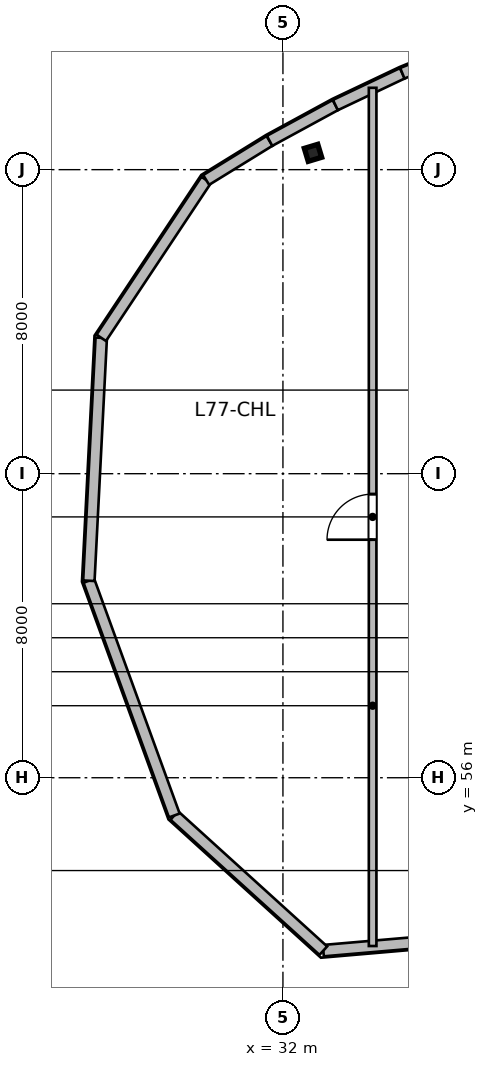
"""IFC4 building model, lengths in metres.
Left out: names, types, materials, properties, quantities, classifications, styles, units other than length and angle.
Written with IfcOpenShell. Run it as: python <this file> out.ifc"""

import sys

from ifc_helpers import new_model, si_unit, direction, frame, frame_2d, origin, origin_2d, place, context, subcontext, project, spatial, rectangle, i_section, extrude, source, transform, mapped, element, fill, save


model = new_model("IFC4")
c1 = context("Model", 3, precision=1e-05, world=origin(), true_north=direction((0.0, 1.0)))
c2 = subcontext(c1, "Body", "Model", "MODEL_VIEW")
j1 = project(units=[si_unit("LENGTHUNIT", "METRE"), si_unit("PLANEANGLEUNIT", "RADIAN")], contexts=[c1])
p1 = place(None, origin())
s1 = spatial("IfcSite", under=j1, at=p1, CompositionType="ELEMENT")
p2 = place(p1, origin())
s2 = spatial("IfcBuilding", under=s1, at=p2, CompositionType="ELEMENT")
p3 = place(p2, frame((0.0, 0.0, 318.0)))
s3 = spatial("IfcBuildingStorey", under=s2, at=p3, CompositionType="ELEMENT", Elevation=318.0)
m1 = source(origin(), c2, "Body", "SweptSolid", [
    extrude(i_section(OverallWidth=0.369, OverallDepth=0.356, WebThickness=0.011, FlangeThickness=0.018, at=origin_2d()), origin(), (0.0, 0.0, 1.0), 5.4),
])
p4 = place(p3, frame((32.791, 72.442, 0.0), z_axis=(0.0, 0.0, 1.0), x_axis=(-0.288697611798, 0.957420330337, 0.0)))
e1 = element("IfcColumn", 1, at=p4, inside=s3, PredefinedType="COLUMN", context=c2, shape_type="MappedRepresentation", body=[
    mapped(m1, transform((0.0, 0.0, 0.0), scale=1.0)),
])
m2 = source(origin(), c2, "Body", "SweptSolid", [
    extrude(rectangle(XDim=4.111, YDim=0.3, at=frame_2d((2.055, 0.0))), origin(), (0.0, 0.0, 1.0), 5.12),
])
p5 = place(p3, frame((37.158, 51.803, 0.0), z_axis=(0.0, 0.0, 1.0), x_axis=(-0.996300298771, -0.085940180764, 0.0)))
e2 = element("IfcWall", 2, at=p5, inside=s3, PredefinedType="SOLIDWALL", context=c2, shape_type="MappedRepresentation", body=[
    mapped(m2, transform((0.0, 0.0, 0.0), scale=1.0)),
])
m3 = source(origin(), c2, "Body", "SweptSolid", [
    extrude(rectangle(XDim=5.294, YDim=0.3, at=frame_2d((2.647, 0.0))), origin(), (0.0, 0.0, 1.0), 5.12),
])
p6 = place(p3, frame((33.062, 51.45, 0.0), z_axis=(0.0, 0.0, 1.0), x_axis=(-0.740695017527, 0.671841418052, 0.0)))
e3 = element("IfcWall", 3, at=p6, inside=s3, PredefinedType="SOLIDWALL", context=c2, shape_type="MappedRepresentation", body=[
    mapped(m3, transform((0.0, 0.0, 0.0), scale=1.0)),
])
m4 = source(origin(), c2, "Body", "SweptSolid", [
    extrude(rectangle(XDim=6.573, YDim=0.3, at=frame_2d((3.287, 0.0))), origin(), (0.0, 0.0, 1.0), 5.12),
])
p7 = place(p3, frame((29.141, 55.007, 0.0), z_axis=(0.0, 0.0, 1.0), x_axis=(-0.342017422465, 0.939693611094, 0.0)))
e4 = element("IfcWall", 4, at=p7, inside=s3, PredefinedType="SOLIDWALL", context=c2, shape_type="MappedRepresentation", body=[
    mapped(m4, transform((0.0, 0.0, 0.0), scale=1.0)),
])
m5 = source(origin(), c2, "Body", "SweptSolid", [
    extrude(rectangle(XDim=6.4, YDim=0.3, at=frame_2d((3.2, 0.0))), origin(), (0.0, 0.0, 1.0), 5.12),
])
p8 = place(p3, frame((26.893, 61.183, 0.0), z_axis=(0.0, 0.0, 1.0), x_axis=(0.050888906156, 0.998704320222, 0.0)))
e5 = element("IfcWall", 5, at=p8, inside=s3, PredefinedType="SOLIDWALL", context=c2, shape_type="MappedRepresentation", body=[
    mapped(m5, transform((0.0, 0.0, 0.0), scale=1.0)),
])
m6 = source(origin(), c2, "Body", "SweptSolid", [
    extrude(rectangle(XDim=4.988, YDim=0.3, at=frame_2d((2.494, 0.0))), origin(), (0.0, 0.0, 1.0), 5.12),
])
p9 = place(p3, frame((27.219, 67.575, 0.0), z_axis=(0.0, 0.0, 1.0), x_axis=(0.553468328856, 0.832870223356, 0.0)))
e6 = element("IfcWall", 6, at=p9, inside=s3, PredefinedType="SOLIDWALL", context=c2, shape_type="MappedRepresentation", body=[
    mapped(m6, transform((0.0, 0.0, 0.0), scale=1.0)),
])
m7 = source(origin(), c2, "Body", "SweptSolid", [
    extrude(rectangle(XDim=1.96, YDim=0.3, at=frame_2d((0.98, 0.0))), origin(), (0.0, 0.0, 1.0), 5.12),
])
p10 = place(p3, frame((29.979, 71.729, 0.0), z_axis=(0.0, 0.0, 1.0), x_axis=(0.85131178833, 0.524660117647, 0.0)))
e7 = element("IfcWall", 7, at=p10, inside=s3, PredefinedType="SOLIDWALL", context=c2, shape_type="MappedRepresentation", body=[
    mapped(m7, transform((0.0, 0.0, 0.0), scale=1.0)),
])
m8 = source(origin(), c2, "Body", "SweptSolid", [
    extrude(rectangle(XDim=1.972, YDim=0.3, at=frame_2d((0.986, 0.0))), origin(), (0.0, 0.0, 1.0), 5.12),
])
p11 = place(p3, frame((31.648, 72.758, 0.0), z_axis=(0.0, 0.0, 1.0), x_axis=(0.878387239208, 0.477949639603, 0.0)))
e8 = element("IfcWall", 8, at=p11, inside=s3, PredefinedType="SOLIDWALL", context=c2, shape_type="MappedRepresentation", body=[
    mapped(m8, transform((0.0, 0.0, 0.0), scale=1.0)),
])
m9 = source(origin(), c2, "Body", "SweptSolid", [
    extrude(rectangle(XDim=1.95, YDim=0.3, at=frame_2d((0.975, 0.0))), origin(), (0.0, 0.0, 1.0), 5.12),
])
p12 = place(p3, frame((33.38, 73.7, 0.0), z_axis=(0.0, 0.0, 1.0), x_axis=(0.903429098402, 0.428737523621, 0.0)))
e9 = element("IfcWall", 9, at=p12, inside=s3, PredefinedType="SOLIDWALL", context=c2, shape_type="MappedRepresentation", body=[
    mapped(m9, transform((0.0, 0.0, 0.0), scale=1.0)),
])
m10 = source(origin(), c2, "Body", "SweptSolid", [
    extrude(rectangle(XDim=1.93, YDim=0.3, at=frame_2d((0.965, 0.0))), origin(), (0.0, 0.0, 1.0), 5.12),
])
p13 = place(p3, frame((35.142, 74.536, 0.0), z_axis=(0.0, 0.0, 1.0), x_axis=(0.926200349129, 0.377031713882, 0.0)))
e10 = element("IfcWall", 10, at=p13, inside=s3, PredefinedType="SOLIDWALL", context=c2, shape_type="MappedRepresentation", body=[
    mapped(m10, transform((0.0, 0.0, 0.0), scale=1.0)),
])
m11 = source(origin(), c2, "Body", "SweptSolid", [
    extrude(rectangle(XDim=22.582, YDim=0.2, at=frame_2d((11.291, 0.0))), origin(), (0.0, 0.0, 1.0), 5.12),
])
p14 = place(p3, frame((34.36, 51.572, 0.0), z_axis=(0.0, 0.0, 1.0), x_axis=(0.0, 1.0, 0.0)))
e11 = element("IfcWall", 11, at=p14, inside=s3, PredefinedType="SOLIDWALL", context=c2, shape_type="MappedRepresentation", body=[
    mapped(m11, transform((0.0, 0.0, 0.0), scale=1.0)),
])
p15 = place(p14, frame((10.691, 0.0, 0.0)))
e12 = element("IfcOpeningElement", 12, at=p15, cuts=e11, PredefinedType="OPENING", context=c2, shape_type="SweptSolid", body=[
    extrude(rectangle(XDim=1.2, YDim=2.15, at=frame_2d((0.6, 1.075))), frame((0.0, 0.11, 0.0), z_axis=(0.0, -1.0, 0.0), x_axis=(1.0, 0.0, 0.0)), (0.0, 0.0, 1.0), 0.22),
])
m12 = source(origin(), c2, "Body", "SweptSolid", [
    extrude(rectangle(XDim=1.2, YDim=2.15, at=frame_2d((0.6, 1.075))), frame((0.0, 0.025, 0.0), z_axis=(0.0, -1.0, 0.0), x_axis=(1.0, 0.0, 0.0)), (0.0, 0.0, 1.0), 0.05),
])
p16 = place(p15, origin())
e13 = element("IfcDoor", 13, at=p16, inside=s3, OperationType="SINGLE_SWING_LEFT", PredefinedType="DOOR", context=c2, shape_type="MappedRepresentation", body=[
    mapped(m12, transform((0.0, 0.0, 0.0), scale=1.0)),
])
fill(e12, e13)
save(model, sys.argv[1])
